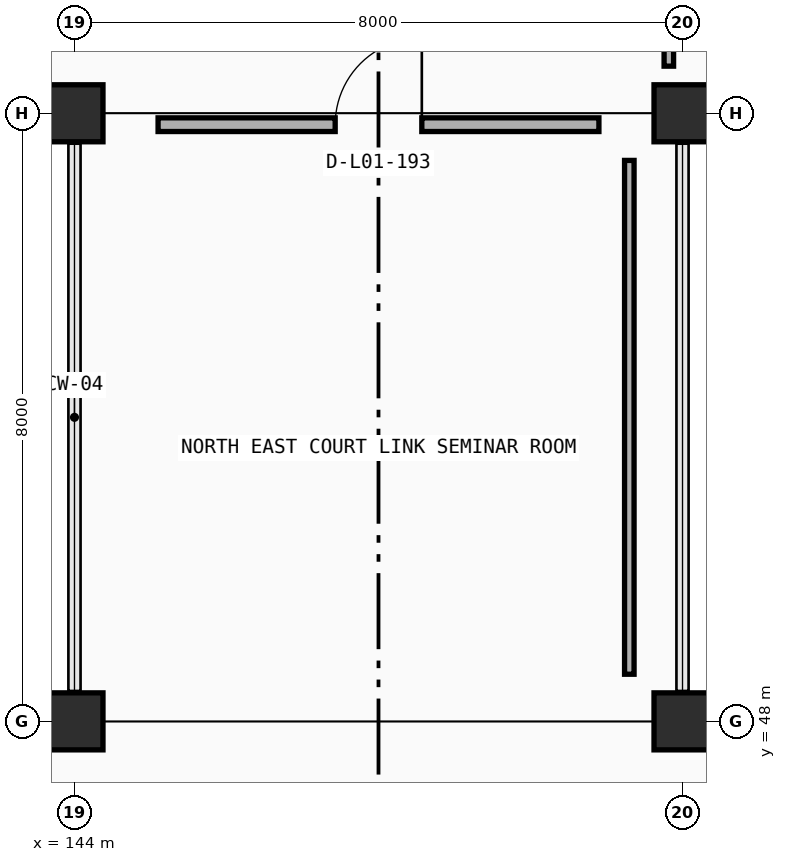
"""IFC4 building model, lengths in metres.
Left out: names, types, materials, properties, quantities, classifications, styles, units other than length and angle.
Written with IfcOpenShell. Run it as: python <this file> out.ifc"""

import sys

from ifc_helpers import new_model, si_unit, direction, frame, frame_2d, origin, origin_2d, place, context, subcontext, project, spatial, rectangle, extrude, element, fill, save


model = new_model("IFC4")
c1 = context("Model", 3, precision=1e-05, world=origin(), true_north=direction((0.0, 1.0)))
c2 = subcontext(c1, "Body", "Model", "MODEL_VIEW")
j1 = project(units=[si_unit("LENGTHUNIT", "METRE"), si_unit("PLANEANGLEUNIT", "RADIAN")], contexts=[c1])
p1 = place(None, origin())
s1 = spatial("IfcSite", under=j1, at=p1, CompositionType="ELEMENT")
p2 = place(p1, origin())
s2 = spatial("IfcBuilding", under=s1, at=p2, CompositionType="ELEMENT")
p3 = place(p2, origin())
s3 = spatial("IfcBuildingStorey", under=s2, at=p3, CompositionType="ELEMENT", Elevation=0.0)
for number, where, z_axis, x_axis in (
    (1, (144.0, 48.0, 0.0), (0.0, 0.0, 1.0), (1.0, 0.0, 0.0)),
    (2, (152.0, 48.0, 0.0), (0.0, 0.0, 1.0), (1.0, 0.0, 0.0)),
    (3, (144.0, 56.0, 0.0), (0.0, 0.0, 1.0), (1.0, 0.0, 0.0)),
    (4, (152.0, 56.0, 0.0), (0.0, 0.0, 1.0), (1.0, 0.0, 0.0)),
):
    element("IfcColumn", number, at=place(p3, frame(where, z_axis=z_axis, x_axis=x_axis)), inside=s3, PredefinedType="COLUMN", context=c2, shape_type="SweptSolid", body=[
        extrude(rectangle(XDim=0.75, YDim=0.75, at=origin_2d()), origin(), (0.0, 0.0, 1.0), 4.8),
    ])
p4 = place(p3, frame((151.82, 56.62, 0.0), z_axis=(0.0, 0.0, 1.0), x_axis=(0.0, 1.0, 0.0)))
e5 = element("IfcWall", 5, at=p4, inside=s3, PredefinedType="PARTITIONING", context=c2, shape_type="SweptSolid", body=[
    extrude(rectangle(XDim=6.81, YDim=0.125, at=frame_2d((3.405, 0.0))), origin(), (0.0, 0.0, 1.0), 3.76),
])
p5 = place(p3, frame((145.1, 55.85, 0.0), z_axis=(0.0, 0.0, 1.0), x_axis=(1.0, 0.0, 0.0)))
e6 = element("IfcWall", 6, at=p5, inside=s3, PredefinedType="PARTITIONING", context=c2, shape_type="SweptSolid", body=[
    extrude(rectangle(XDim=5.8, YDim=0.18, at=frame_2d((2.9, 0.0))), origin(), (0.0, 0.0, 1.0), 3.9),
])
p6 = place(p5, frame((2.33, 0.0, 0.0)))
e7 = element("IfcOpeningElement", 7, at=p6, cuts=e6, PredefinedType="OPENING", context=c2, shape_type="SweptSolid", body=[
    extrude(rectangle(XDim=1.14, YDim=2.15, at=frame_2d((0.57, 1.075))), frame((0.0, 0.1, 0.0), z_axis=(0.0, -1.0, 0.0), x_axis=(1.0, 0.0, 0.0)), (0.0, 0.0, 1.0), 0.2),
])
p7 = place(p3, frame((151.3, 48.62, 0.0), z_axis=(0.0, 0.0, 1.0), x_axis=(0.0, 1.0, 0.0)))
e8 = element("IfcWall", 8, at=p7, inside=s3, PredefinedType="PARTITIONING", context=c2, shape_type="SweptSolid", body=[
    extrude(rectangle(XDim=6.76, YDim=0.125, at=frame_2d((3.38, 0.0))), origin(), (0.0, 0.0, 1.0), 3.9),
])
p8 = place(p6, origin())
e9 = element("IfcDoor", 9, at=p8, inside=s3, OperationType="SINGLE_SWING_RIGHT", PredefinedType="DOOR", context=c2, shape_type="SweptSolid", body=[
    extrude(rectangle(XDim=1.14, YDim=2.15, at=frame_2d((0.57, 1.075))), frame((0.0, 0.025, 0.0), z_axis=(0.0, -1.0, 0.0), x_axis=(1.0, 0.0, 0.0)), (0.0, 0.0, 1.0), 0.05),
])
fill(e7, e9)
save(model, sys.argv[1])
